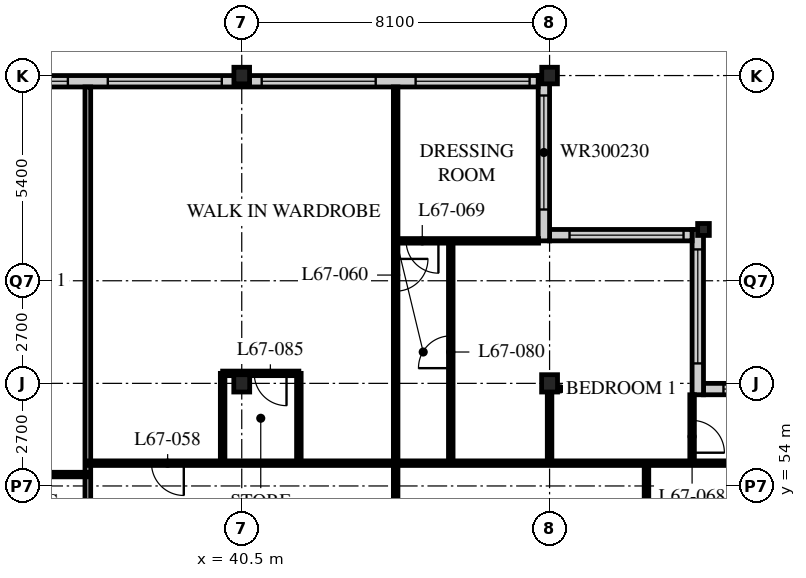
"""IFC4 building model, lengths in metres.
Left out: names, types, materials, properties, quantities, classifications, styles, units other than length and angle.
Written with IfcOpenShell. Run it as: python <this file> out.ifc"""

import sys

from ifc_helpers import new_model, si_unit, direction, frame, frame_2d, origin, origin_2d, place, context, subcontext, project, spatial, rectangle, i_section, extrude, element, fill, save


model = new_model("IFC4")
c1 = context("Model", 3, precision=1e-05, world=origin(), true_north=direction((0.0, 1.0)))
c2 = subcontext(c1, "Body", "Model", "MODEL_VIEW")
j1 = project(units=[si_unit("LENGTHUNIT", "METRE"), si_unit("PLANEANGLEUNIT", "RADIAN")], contexts=[c1])
p1 = place(None, origin())
s1 = spatial("IfcSite", under=j1, at=p1, CompositionType="ELEMENT")
p2 = place(p1, origin())
s2 = spatial("IfcBuilding", under=s1, at=p2, CompositionType="ELEMENT")
p3 = place(p2, frame((0.0, 0.0, 261.9)))
s3 = spatial("IfcBuildingStorey", under=s2, at=p3, CompositionType="ELEMENT", Elevation=261.9)
p4 = place(p3, frame((40.5, 56.7, 0.0), z_axis=(0.0, 0.0, 1.0), x_axis=(1.0, 0.0, 0.0)))
e1 = element("IfcColumn", 1, at=p4, inside=s3, PredefinedType="COLUMN", context=c2, shape_type="SweptSolid", body=[
    extrude(i_section(OverallWidth=0.418, OverallDepth=0.456, WebThickness=0.042, FlangeThickness=0.067, FilletRadius=0.015, at=origin_2d()), origin(), (0.0, 0.0, 1.0), 3.9),
])
p5 = place(p3, frame((40.5, 64.8, 0.0), z_axis=(0.0, 0.0, 1.0), x_axis=(1.0, 0.0, 0.0)))
e2 = element("IfcColumn", 2, at=p5, inside=s3, PredefinedType="COLUMN", context=c2, shape_type="SweptSolid", body=[
    extrude(i_section(OverallWidth=0.412, OverallDepth=0.437, WebThickness=0.036, FlangeThickness=0.058, FilletRadius=0.015, at=origin_2d()), origin(), (0.0, 0.0, 1.0), 3.9),
])
p6 = place(p3, frame((48.6, 56.7, 0.0), z_axis=(0.0, 0.0, 1.0), x_axis=(1.0, 0.0, 0.0)))
e3 = element("IfcColumn", 3, at=p6, inside=s3, PredefinedType="COLUMN", context=c2, shape_type="SweptSolid", body=[
    extrude(i_section(OverallWidth=0.418, OverallDepth=0.456, WebThickness=0.042, FlangeThickness=0.067, FilletRadius=0.015, at=origin_2d()), origin(), (0.0, 0.0, 1.0), 3.9),
])
p7 = place(p3, frame((48.6, 64.8, 0.0), z_axis=(0.0, 0.0, 1.0), x_axis=(1.0, 0.0, 0.0)))
e4 = element("IfcColumn", 4, at=p7, inside=s3, PredefinedType="COLUMN", context=c2, shape_type="SweptSolid", body=[
    extrude(i_section(OverallWidth=0.412, OverallDepth=0.437, WebThickness=0.036, FlangeThickness=0.058, FilletRadius=0.015, at=origin_2d()), origin(), (0.0, 0.0, 1.0), 3.9),
])
p8 = place(p3, frame((52.65, 60.75, 0.0), z_axis=(0.0, 0.0, 1.0), x_axis=(1.0, 0.0, 0.0)))
e5 = element("IfcColumn", 5, at=p8, inside=s3, PredefinedType="COLUMN", context=c2, shape_type="SweptSolid", body=[
    extrude(i_section(OverallWidth=0.307, OverallDepth=0.314, WebThickness=0.012, FlangeThickness=0.019, FilletRadius=0.015, at=origin_2d()), origin(), (0.0, 0.0, 1.0), 3.9),
])
p9 = place(p3, frame((56.4, 56.55, 0.0), z_axis=(0.0, 0.0, 1.0), x_axis=(-1.0, 0.0, 0.0)))
e6 = element("IfcWall", 6, at=p9, inside=s3, PredefinedType="SOLIDWALL", context=c2, shape_type="SweptSolid", body=[
    extrude(rectangle(XDim=3.75, YDim=0.3, at=frame_2d((1.875, 0.0))), origin(), (0.0, 0.0, 1.0), 3.69),
])
p10 = place(p9, frame((0.225, 0.0, 0.6)))
e7 = element("IfcOpeningElement", 7, at=p10, cuts=e6, PredefinedType="OPENING", context=c2, shape_type="SweptSolid", body=[
    extrude(rectangle(XDim=3.0, YDim=2.3, at=frame_2d((1.5, 1.15))), frame((0.0, 0.16, 0.0), z_axis=(0.0, -1.0, 0.0), x_axis=(1.0, 0.0, 0.0)), (0.0, 0.0, 1.0), 0.32),
])
p11 = place(p3, frame((52.5, 56.4, 0.0), z_axis=(0.0, 0.0, 1.0), x_axis=(0.0, 1.0, 0.0)))
e8 = element("IfcWall", 8, at=p11, inside=s3, PredefinedType="SOLIDWALL", context=c2, shape_type="SweptSolid", body=[
    extrude(rectangle(XDim=4.35, YDim=0.3, at=frame_2d((2.175, 0.0))), origin(), (0.0, 0.0, 1.0), 3.69),
])
p12 = place(p11, frame((0.825, 0.0, 0.6)))
e9 = element("IfcOpeningElement", 9, at=p12, cuts=e8, PredefinedType="OPENING", context=c2, shape_type="SweptSolid", body=[
    extrude(rectangle(XDim=3.0, YDim=2.3, at=frame_2d((1.5, 1.15))), frame((0.0, 0.16, 0.0), z_axis=(0.0, -1.0, 0.0), x_axis=(1.0, 0.0, 0.0)), (0.0, 0.0, 1.0), 0.32),
])
p13 = place(p3, frame((52.35, 60.6, 0.0), z_axis=(0.0, 0.0, 1.0), x_axis=(-1.0, 0.0, 0.0)))
e10 = element("IfcWall", 10, at=p13, inside=s3, PredefinedType="SOLIDWALL", context=c2, shape_type="SweptSolid", body=[
    extrude(rectangle(XDim=3.75, YDim=0.3, at=frame_2d((1.875, 0.0))), origin(), (0.0, 0.0, 1.0), 3.69),
])
p14 = place(p13, frame((0.225, 0.0, 0.6)))
e11 = element("IfcOpeningElement", 11, at=p14, cuts=e10, PredefinedType="OPENING", context=c2, shape_type="SweptSolid", body=[
    extrude(rectangle(XDim=3.0, YDim=2.3, at=frame_2d((1.5, 1.15))), frame((0.0, 0.16, 0.0), z_axis=(0.0, -1.0, 0.0), x_axis=(1.0, 0.0, 0.0)), (0.0, 0.0, 1.0), 0.32),
])
p15 = place(p3, frame((48.45, 60.45, 0.0), z_axis=(0.0, 0.0, 1.0), x_axis=(0.0, 1.0, 0.0)))
e12 = element("IfcWall", 12, at=p15, inside=s3, PredefinedType="SOLIDWALL", context=c2, shape_type="SweptSolid", body=[
    extrude(rectangle(XDim=4.35, YDim=0.3, at=frame_2d((2.175, 0.0))), origin(), (0.0, 0.0, 1.0), 3.69),
])
p16 = place(p15, frame((0.825, 0.0, 0.6)))
e13 = element("IfcOpeningElement", 13, at=p16, cuts=e12, PredefinedType="OPENING", context=c2, shape_type="SweptSolid", body=[
    extrude(rectangle(XDim=3.0, YDim=2.3, at=frame_2d((1.5, 1.15))), frame((0.0, 0.16, 0.0), z_axis=(0.0, -1.0, 0.0), x_axis=(1.0, 0.0, 0.0)), (0.0, 0.0, 1.0), 0.32),
])
p17 = place(p3, frame((48.3, 64.65, 0.0), z_axis=(0.0, 0.0, 1.0), x_axis=(-1.0, 0.0, 0.0)))
e14 = element("IfcWall", 14, at=p17, inside=s3, PredefinedType="SOLIDWALL", context=c2, shape_type="SweptSolid", body=[
    extrude(rectangle(XDim=40.2, YDim=0.3, at=frame_2d((20.1, 0.0))), origin(), (0.0, 0.0, 1.0), 3.69),
])
p18 = place(p17, frame((0.225, 0.0, 0.6)))
e15 = element("IfcOpeningElement", 15, at=p18, cuts=e14, PredefinedType="OPENING", context=c2, shape_type="SweptSolid", body=[
    extrude(rectangle(XDim=3.0, YDim=2.4, at=frame_2d((1.5, 1.2))), frame((0.0, 0.16, 0.0), z_axis=(0.0, -1.0, 0.0), x_axis=(1.0, 0.0, 0.0)), (0.0, 0.0, 1.0), 0.32),
])
p19 = place(p17, frame((4.275, 0.0, 0.6)))
e16 = element("IfcOpeningElement", 16, at=p19, cuts=e14, PredefinedType="OPENING", context=c2, shape_type="SweptSolid", body=[
    extrude(rectangle(XDim=3.0, YDim=2.4, at=frame_2d((1.5, 1.2))), frame((0.0, 0.16, 0.0), z_axis=(0.0, -1.0, 0.0), x_axis=(1.0, 0.0, 0.0)), (0.0, 0.0, 1.0), 0.32),
])
p20 = place(p17, frame((8.325, 0.0, 0.6)))
e17 = element("IfcOpeningElement", 17, at=p20, cuts=e14, PredefinedType="OPENING", context=c2, shape_type="SweptSolid", body=[
    extrude(rectangle(XDim=3.0, YDim=2.4, at=frame_2d((1.5, 1.2))), frame((0.0, 0.16, 0.0), z_axis=(0.0, -1.0, 0.0), x_axis=(1.0, 0.0, 0.0)), (0.0, 0.0, 1.0), 0.32),
])
p21 = place(p17, frame((12.375, 0.0, 0.6)))
e18 = element("IfcOpeningElement", 18, at=p21, cuts=e14, PredefinedType="OPENING", context=c2, shape_type="SweptSolid", body=[
    extrude(rectangle(XDim=3.0, YDim=2.4, at=frame_2d((1.5, 1.2))), frame((0.0, 0.16, 0.0), z_axis=(0.0, -1.0, 0.0), x_axis=(1.0, 0.0, 0.0)), (0.0, 0.0, 1.0), 0.32),
])
p22 = place(p17, frame((16.425, 0.0, 0.6)))
e19 = element("IfcOpeningElement", 19, at=p22, cuts=e14, PredefinedType="OPENING", context=c2, shape_type="SweptSolid", body=[
    extrude(rectangle(XDim=3.0, YDim=2.4, at=frame_2d((1.5, 1.2))), frame((0.0, 0.16, 0.0), z_axis=(0.0, -1.0, 0.0), x_axis=(1.0, 0.0, 0.0)), (0.0, 0.0, 1.0), 0.32),
])
p23 = place(p17, frame((20.475, 0.0, 0.6)))
e20 = element("IfcOpeningElement", 20, at=p23, cuts=e14, PredefinedType="OPENING", context=c2, shape_type="SweptSolid", body=[
    extrude(rectangle(XDim=3.0, YDim=2.4, at=frame_2d((1.5, 1.2))), frame((0.0, 0.16, 0.0), z_axis=(0.0, -1.0, 0.0), x_axis=(1.0, 0.0, 0.0)), (0.0, 0.0, 1.0), 0.32),
])
p24 = place(p17, frame((24.525, 0.0, 0.6)))
e21 = element("IfcOpeningElement", 21, at=p24, cuts=e14, PredefinedType="OPENING", context=c2, shape_type="SweptSolid", body=[
    extrude(rectangle(XDim=3.0, YDim=2.4, at=frame_2d((1.5, 1.2))), frame((0.0, 0.16, 0.0), z_axis=(0.0, -1.0, 0.0), x_axis=(1.0, 0.0, 0.0)), (0.0, 0.0, 1.0), 0.32),
])
p25 = place(p17, frame((28.575, 0.0, 0.6)))
e22 = element("IfcOpeningElement", 22, at=p25, cuts=e14, PredefinedType="OPENING", context=c2, shape_type="SweptSolid", body=[
    extrude(rectangle(XDim=3.0, YDim=2.4, at=frame_2d((1.5, 1.2))), frame((0.0, 0.16, 0.0), z_axis=(0.0, -1.0, 0.0), x_axis=(1.0, 0.0, 0.0)), (0.0, 0.0, 1.0), 0.32),
])
p26 = place(p17, frame((32.625, 0.0, 0.6)))
e23 = element("IfcOpeningElement", 23, at=p26, cuts=e14, PredefinedType="OPENING", context=c2, shape_type="SweptSolid", body=[
    extrude(rectangle(XDim=3.0, YDim=2.4, at=frame_2d((1.5, 1.2))), frame((0.0, 0.16, 0.0), z_axis=(0.0, -1.0, 0.0), x_axis=(1.0, 0.0, 0.0)), (0.0, 0.0, 1.0), 0.32),
])
p27 = place(p17, frame((36.675, 0.0, 0.6)))
e24 = element("IfcOpeningElement", 24, at=p27, cuts=e14, PredefinedType="OPENING", context=c2, shape_type="SweptSolid", body=[
    extrude(rectangle(XDim=3.0, YDim=2.4, at=frame_2d((1.5, 1.2))), frame((0.0, 0.16, 0.0), z_axis=(0.0, -1.0, 0.0), x_axis=(1.0, 0.0, 0.0)), (0.0, 0.0, 1.0), 0.32),
])
p28 = place(p3, frame((36.45, 64.5, 0.0), z_axis=(0.0, 0.0, 1.0), x_axis=(0.0, -1.0, 0.0)))
e25 = element("IfcWall", 25, at=p28, inside=s3, PredefinedType="PARTITIONING", context=c2, shape_type="SweptSolid", body=[
    extrude(rectangle(XDim=15.9, YDim=0.15, at=frame_2d((7.95, 0.0))), origin(), (0.0, 0.0, 1.0), 3.69),
])
p29 = place(p3, frame((36.45, 54.6, 0.0), z_axis=(0.0, 0.0, 1.0), x_axis=(1.0, 0.0, 0.0)))
e26 = element("IfcWall", 26, at=p29, inside=s3, PredefinedType="PARTITIONING", context=c2, shape_type="SweptSolid", body=[
    extrude(rectangle(XDim=19.95, YDim=0.12, at=frame_2d((9.975, 0.0))), origin(), (0.0, 0.0, 1.0), 3.69),
])
p30 = place(p29, frame((1.675, 0.0, 0.0)))
e27 = element("IfcOpeningElement", 27, at=p30, cuts=e26, PredefinedType="OPENING", context=c2, shape_type="SweptSolid", body=[
    extrude(rectangle(XDim=0.85, YDim=2.1, at=frame_2d((0.425, 1.05))), frame((0.0, 0.07, 0.0), z_axis=(0.0, -1.0, 0.0), x_axis=(1.0, 0.0, 0.0)), (0.0, 0.0, 1.0), 0.14),
])
p31 = place(p3, frame((44.55, 64.5, 0.0), z_axis=(0.0, 0.0, 1.0), x_axis=(0.0, -1.0, 0.0)))
e28 = element("IfcWall", 28, at=p31, inside=s3, PredefinedType="PARTITIONING", context=c2, shape_type="SweptSolid", body=[
    extrude(rectangle(XDim=17.7, YDim=0.12, at=frame_2d((8.85, 0.0))), origin(), (0.0, 0.0, 1.0), 3.69),
])
p32 = place(p31, frame((12.475, 0.0, 0.0)))
e29 = element("IfcOpeningElement", 29, at=p32, cuts=e28, PredefinedType="OPENING", context=c2, shape_type="SweptSolid", body=[
    extrude(rectangle(XDim=0.85, YDim=2.1, at=frame_2d((0.425, 1.05))), frame((0.0, 0.07, 0.0), z_axis=(0.0, -1.0, 0.0), x_axis=(1.0, 0.0, 0.0)), (0.0, 0.0, 1.0), 0.14),
])
p33 = place(p31, frame((4.525, 0.0, 0.0)))
e30 = element("IfcOpeningElement", 30, at=p33, cuts=e28, PredefinedType="OPENING", context=c2, shape_type="SweptSolid", body=[
    extrude(rectangle(XDim=0.85, YDim=2.1, at=frame_2d((0.425, 1.05))), frame((0.0, 0.07, 0.0), z_axis=(0.0, -1.0, 0.0), x_axis=(1.0, 0.0, 0.0)), (0.0, 0.0, 1.0), 0.14),
])
p34 = place(p3, frame((52.35, 54.6, 0.0), z_axis=(0.0, 0.0, 1.0), x_axis=(0.0, 1.0, 0.0)))
e31 = element("IfcWall", 31, at=p34, inside=s3, PredefinedType="PARTITIONING", context=c2, shape_type="SweptSolid", body=[
    extrude(rectangle(XDim=1.8, YDim=0.12, at=frame_2d((0.9, 0.0))), origin(), (0.0, 0.0, 1.0), 3.69),
])
p35 = place(p34, frame((0.275, 0.0, 0.0)))
e32 = element("IfcOpeningElement", 32, at=p35, cuts=e31, PredefinedType="OPENING", context=c2, shape_type="SweptSolid", body=[
    extrude(rectangle(XDim=0.85, YDim=2.1, at=frame_2d((0.425, 1.05))), frame((0.0, 0.07, 0.0), z_axis=(0.0, -1.0, 0.0), x_axis=(1.0, 0.0, 0.0)), (0.0, 0.0, 1.0), 0.14),
])
p36 = place(p3, frame((48.31, 60.45, 0.0), z_axis=(0.0, 0.0, 1.0), x_axis=(-1.0, 0.0, 0.0)))
e33 = element("IfcWall", 33, at=p36, inside=s3, PredefinedType="PARTITIONING", context=c2, shape_type="SweptSolid", body=[
    extrude(rectangle(XDim=3.76, YDim=0.12, at=frame_2d((1.88, 0.0))), origin(), (0.0, 0.0, 1.0), 3.69),
])
p37 = place(p36, frame((2.635, 0.0, 0.0)))
e34 = element("IfcOpeningElement", 34, at=p37, cuts=e33, PredefinedType="OPENING", context=c2, shape_type="SweptSolid", body=[
    extrude(rectangle(XDim=0.85, YDim=2.1, at=frame_2d((0.425, 1.05))), frame((0.0, 0.07, 0.0), z_axis=(0.0, -1.0, 0.0), x_axis=(1.0, 0.0, 0.0)), (0.0, 0.0, 1.0), 0.14),
])
p38 = place(p3, frame((32.4, 54.3, 0.0), z_axis=(0.0, 0.0, 1.0), x_axis=(1.0, 0.0, 0.0)))
e35 = element("IfcWall", 35, at=p38, inside=s3, PredefinedType="PARTITIONING", context=c2, shape_type="SweptSolid", body=[
    extrude(rectangle(XDim=4.05, YDim=0.12, at=frame_2d((2.025, 0.0))), origin(), (0.0, 0.0, 1.0), 3.69),
])
p39 = place(p38, frame((1.6, 0.0, 0.0)))
e36 = element("IfcOpeningElement", 36, at=p39, cuts=e35, PredefinedType="OPENING", context=c2, shape_type="SweptSolid", body=[
    extrude(rectangle(XDim=0.85, YDim=2.1, at=frame_2d((0.425, 1.05))), frame((0.0, 0.07, 0.0), z_axis=(0.0, -1.0, 0.0), x_axis=(1.0, 0.0, 0.0)), (0.0, 0.0, 1.0), 0.14),
])
p40 = place(p3, frame((51.15, 46.8, 0.0), z_axis=(0.0, 0.0, 1.0), x_axis=(0.0, 1.0, 0.0)))
e37 = element("IfcWall", 37, at=p40, inside=s3, PredefinedType="PARTITIONING", context=c2, shape_type="SweptSolid", body=[
    extrude(rectangle(XDim=7.8, YDim=0.12, at=frame_2d((3.9, 0.0))), origin(), (0.0, 0.0, 1.0), 3.69),
])
p41 = place(p40, frame((3.475, 0.0, 0.0)))
e38 = element("IfcOpeningElement", 38, at=p41, cuts=e37, PredefinedType="OPENING", context=c2, shape_type="SweptSolid", body=[
    extrude(rectangle(XDim=0.85, YDim=2.1, at=frame_2d((0.425, 1.05))), frame((0.0, 0.07, 0.0), z_axis=(0.0, -1.0, 0.0), x_axis=(1.0, 0.0, 0.0)), (0.0, 0.0, 1.0), 0.14),
])
p42 = place(p3, frame((46.0, 54.6, 0.0), z_axis=(0.0, 0.0, 1.0), x_axis=(0.0, 1.0, 0.0)))
e39 = element("IfcWall", 39, at=p42, inside=s3, PredefinedType="PARTITIONING", context=c2, shape_type="SweptSolid", body=[
    extrude(rectangle(XDim=5.85, YDim=0.12, at=frame_2d((2.925, 0.0))), origin(), (0.0, 0.0, 1.0), 3.69),
])
p43 = place(p42, frame((2.5, 0.0, 0.0)))
e40 = element("IfcOpeningElement", 40, at=p43, cuts=e39, PredefinedType="OPENING", context=c2, shape_type="SweptSolid", body=[
    extrude(rectangle(XDim=0.85, YDim=2.1, at=frame_2d((0.425, 1.05))), frame((0.0, 0.07, 0.0), z_axis=(0.0, -1.0, 0.0), x_axis=(1.0, 0.0, 0.0)), (0.0, 0.0, 1.0), 0.14),
])
for number, where, z_axis, x_axis in (
    (41, (39.997, 54.6, 0.0), (0.0, 0.0, 1.0), (0.0, 1.0, 0.0)),
    (42, (42.003, 54.6, 0.0), (0.0, 0.0, 1.0), (0.0, 1.0, 0.0)),
):
    element("IfcWall", number, at=place(p3, frame(where, z_axis=z_axis, x_axis=x_axis)), inside=s3, PredefinedType="PARTITIONING", context=c2, shape_type="SweptSolid", body=[
        extrude(rectangle(XDim=2.363, YDim=0.12, at=frame_2d((1.181, 0.0))), origin(), (0.0, 0.0, 1.0), 3.69),
    ])
p44 = place(p3, frame((39.997, 56.963, 0.0), z_axis=(0.0, 0.0, 1.0), x_axis=(1.0, 0.0, 0.0)))
e43 = element("IfcWall", 43, at=p44, inside=s3, PredefinedType="PARTITIONING", context=c2, shape_type="SweptSolid", body=[
    extrude(rectangle(XDim=2.006, YDim=0.12, at=frame_2d((1.003, 0.0))), origin(), (0.0, 0.0, 1.0), 3.69),
])
p45 = place(p44, frame((0.831, 0.0, 0.0)))
e44 = element("IfcOpeningElement", 44, at=p45, cuts=e43, PredefinedType="OPENING", context=c2, shape_type="SweptSolid", body=[
    extrude(rectangle(XDim=0.85, YDim=2.1, at=frame_2d((0.425, 1.05))), frame((0.0, 0.07, 0.0), z_axis=(0.0, -1.0, 0.0), x_axis=(1.0, 0.0, 0.0)), (0.0, 0.0, 1.0), 0.14),
])
p46 = place(p3, frame((48.6, 54.6, 0.0), z_axis=(0.0, 0.0, 1.0), x_axis=(0.0, 1.0, 0.0)))
e45 = element("IfcWall", 45, at=p46, inside=s3, PredefinedType="PARTITIONING", context=c2, shape_type="SweptSolid", body=[
    extrude(rectangle(XDim=1.897, YDim=0.12, at=frame_2d((0.948, 0.0))), origin(), (0.0, 0.0, 1.0), 3.078),
])
p47 = place(p10, origin())
e46 = element("IfcWindow", 46, at=p47, inside=s3, PartitioningType="SINGLE_PANEL", PredefinedType="WINDOW", context=c2, shape_type="SweptSolid", body=[
    extrude(rectangle(XDim=3.0, YDim=2.3, at=frame_2d((1.5, 1.15))), frame((0.0, 0.03, 0.0), z_axis=(0.0, -1.0, 0.0), x_axis=(1.0, 0.0, 0.0)), (0.0, 0.0, 1.0), 0.06),
])
fill(e7, e46)
p48 = place(p12, origin())
e47 = element("IfcWindow", 47, at=p48, inside=s3, PartitioningType="SINGLE_PANEL", PredefinedType="WINDOW", context=c2, shape_type="SweptSolid", body=[
    extrude(rectangle(XDim=3.0, YDim=2.3, at=frame_2d((1.5, 1.15))), frame((0.0, 0.03, 0.0), z_axis=(0.0, -1.0, 0.0), x_axis=(1.0, 0.0, 0.0)), (0.0, 0.0, 1.0), 0.06),
])
fill(e9, e47)
p49 = place(p14, origin())
e48 = element("IfcWindow", 48, at=p49, inside=s3, PartitioningType="SINGLE_PANEL", PredefinedType="WINDOW", context=c2, shape_type="SweptSolid", body=[
    extrude(rectangle(XDim=3.0, YDim=2.3, at=frame_2d((1.5, 1.15))), frame((0.0, 0.03, 0.0), z_axis=(0.0, -1.0, 0.0), x_axis=(1.0, 0.0, 0.0)), (0.0, 0.0, 1.0), 0.06),
])
fill(e11, e48)
p50 = place(p16, origin())
e49 = element("IfcWindow", 49, at=p50, inside=s3, PartitioningType="SINGLE_PANEL", PredefinedType="WINDOW", context=c2, shape_type="SweptSolid", body=[
    extrude(rectangle(XDim=3.0, YDim=2.3, at=frame_2d((1.5, 1.15))), frame((0.0, 0.03, 0.0), z_axis=(0.0, -1.0, 0.0), x_axis=(1.0, 0.0, 0.0)), (0.0, 0.0, 1.0), 0.06),
])
fill(e13, e49)
p51 = place(p18, origin())
e50 = element("IfcWindow", 50, at=p51, inside=s3, PartitioningType="SINGLE_PANEL", PredefinedType="WINDOW", context=c2, shape_type="SweptSolid", body=[
    extrude(rectangle(XDim=3.0, YDim=2.4, at=frame_2d((1.5, 1.2))), frame((0.0, 0.03, 0.0), z_axis=(0.0, -1.0, 0.0), x_axis=(1.0, 0.0, 0.0)), (0.0, 0.0, 1.0), 0.06),
])
fill(e15, e50)
p52 = place(p19, origin())
e51 = element("IfcWindow", 51, at=p52, inside=s3, PartitioningType="SINGLE_PANEL", PredefinedType="WINDOW", context=c2, shape_type="SweptSolid", body=[
    extrude(rectangle(XDim=3.0, YDim=2.4, at=frame_2d((1.5, 1.2))), frame((0.0, 0.03, 0.0), z_axis=(0.0, -1.0, 0.0), x_axis=(1.0, 0.0, 0.0)), (0.0, 0.0, 1.0), 0.06),
])
fill(e16, e51)
p53 = place(p20, origin())
e52 = element("IfcWindow", 52, at=p53, inside=s3, PartitioningType="SINGLE_PANEL", PredefinedType="WINDOW", context=c2, shape_type="SweptSolid", body=[
    extrude(rectangle(XDim=3.0, YDim=2.4, at=frame_2d((1.5, 1.2))), frame((0.0, 0.03, 0.0), z_axis=(0.0, -1.0, 0.0), x_axis=(1.0, 0.0, 0.0)), (0.0, 0.0, 1.0), 0.06),
])
fill(e17, e52)
p54 = place(p21, origin())
e53 = element("IfcWindow", 53, at=p54, inside=s3, PartitioningType="SINGLE_PANEL", PredefinedType="WINDOW", context=c2, shape_type="SweptSolid", body=[
    extrude(rectangle(XDim=3.0, YDim=2.4, at=frame_2d((1.5, 1.2))), frame((0.0, 0.03, 0.0), z_axis=(0.0, -1.0, 0.0), x_axis=(1.0, 0.0, 0.0)), (0.0, 0.0, 1.0), 0.06),
])
fill(e18, e53)
p55 = place(p30, origin())
e54 = element("IfcDoor", 54, at=p55, inside=s3, OperationType="SINGLE_SWING_LEFT", PredefinedType="DOOR", context=c2, shape_type="SweptSolid", body=[
    extrude(rectangle(XDim=0.85, YDim=2.1, at=frame_2d((0.425, 1.05))), frame((0.0, 0.025, 0.0), z_axis=(0.0, -1.0, 0.0), x_axis=(1.0, 0.0, 0.0)), (0.0, 0.0, 1.0), 0.05),
])
fill(e27, e54)
p56 = place(p33, origin())
e55 = element("IfcDoor", 55, at=p56, inside=s3, OperationType="SINGLE_SWING_LEFT", PredefinedType="DOOR", context=c2, shape_type="SweptSolid", body=[
    extrude(rectangle(XDim=0.85, YDim=2.1, at=frame_2d((0.425, 1.05))), frame((0.0, 0.025, 0.0), z_axis=(0.0, -1.0, 0.0), x_axis=(1.0, 0.0, 0.0)), (0.0, 0.0, 1.0), 0.05),
])
fill(e30, e55)
p57 = place(p35, origin())
e56 = element("IfcDoor", 56, at=p57, inside=s3, OperationType="SINGLE_SWING_RIGHT", PredefinedType="DOOR", context=c2, shape_type="SweptSolid", body=[
    extrude(rectangle(XDim=0.85, YDim=2.1, at=frame_2d((0.425, 1.05))), frame((0.0, 0.025, 0.0), z_axis=(0.0, -1.0, 0.0), x_axis=(1.0, 0.0, 0.0)), (0.0, 0.0, 1.0), 0.05),
])
fill(e32, e56)
p58 = place(p37, origin())
e57 = element("IfcDoor", 57, at=p58, inside=s3, OperationType="SINGLE_SWING_LEFT", PredefinedType="DOOR", context=c2, shape_type="SweptSolid", body=[
    extrude(rectangle(XDim=0.85, YDim=2.1, at=frame_2d((0.425, 1.05))), frame((0.0, 0.025, 0.0), z_axis=(0.0, -1.0, 0.0), x_axis=(1.0, 0.0, 0.0)), (0.0, 0.0, 1.0), 0.05),
])
fill(e34, e57)
p59 = place(p43, origin())
e58 = element("IfcDoor", 58, at=p59, inside=s3, OperationType="SINGLE_SWING_LEFT", PredefinedType="DOOR", context=c2, shape_type="SweptSolid", body=[
    extrude(rectangle(XDim=0.85, YDim=2.1, at=frame_2d((0.425, 1.05))), frame((0.0, 0.025, 0.0), z_axis=(0.0, -1.0, 0.0), x_axis=(1.0, 0.0, 0.0)), (0.0, 0.0, 1.0), 0.05),
])
fill(e40, e58)
p60 = place(p45, origin())
e59 = element("IfcDoor", 59, at=p60, inside=s3, OperationType="SINGLE_SWING_LEFT", PredefinedType="DOOR", context=c2, shape_type="SweptSolid", body=[
    extrude(rectangle(XDim=0.85, YDim=2.1, at=frame_2d((0.425, 1.05))), frame((0.0, 0.025, 0.0), z_axis=(0.0, -1.0, 0.0), x_axis=(1.0, 0.0, 0.0)), (0.0, 0.0, 1.0), 0.05),
])
fill(e44, e59)
save(model, sys.argv[1])
